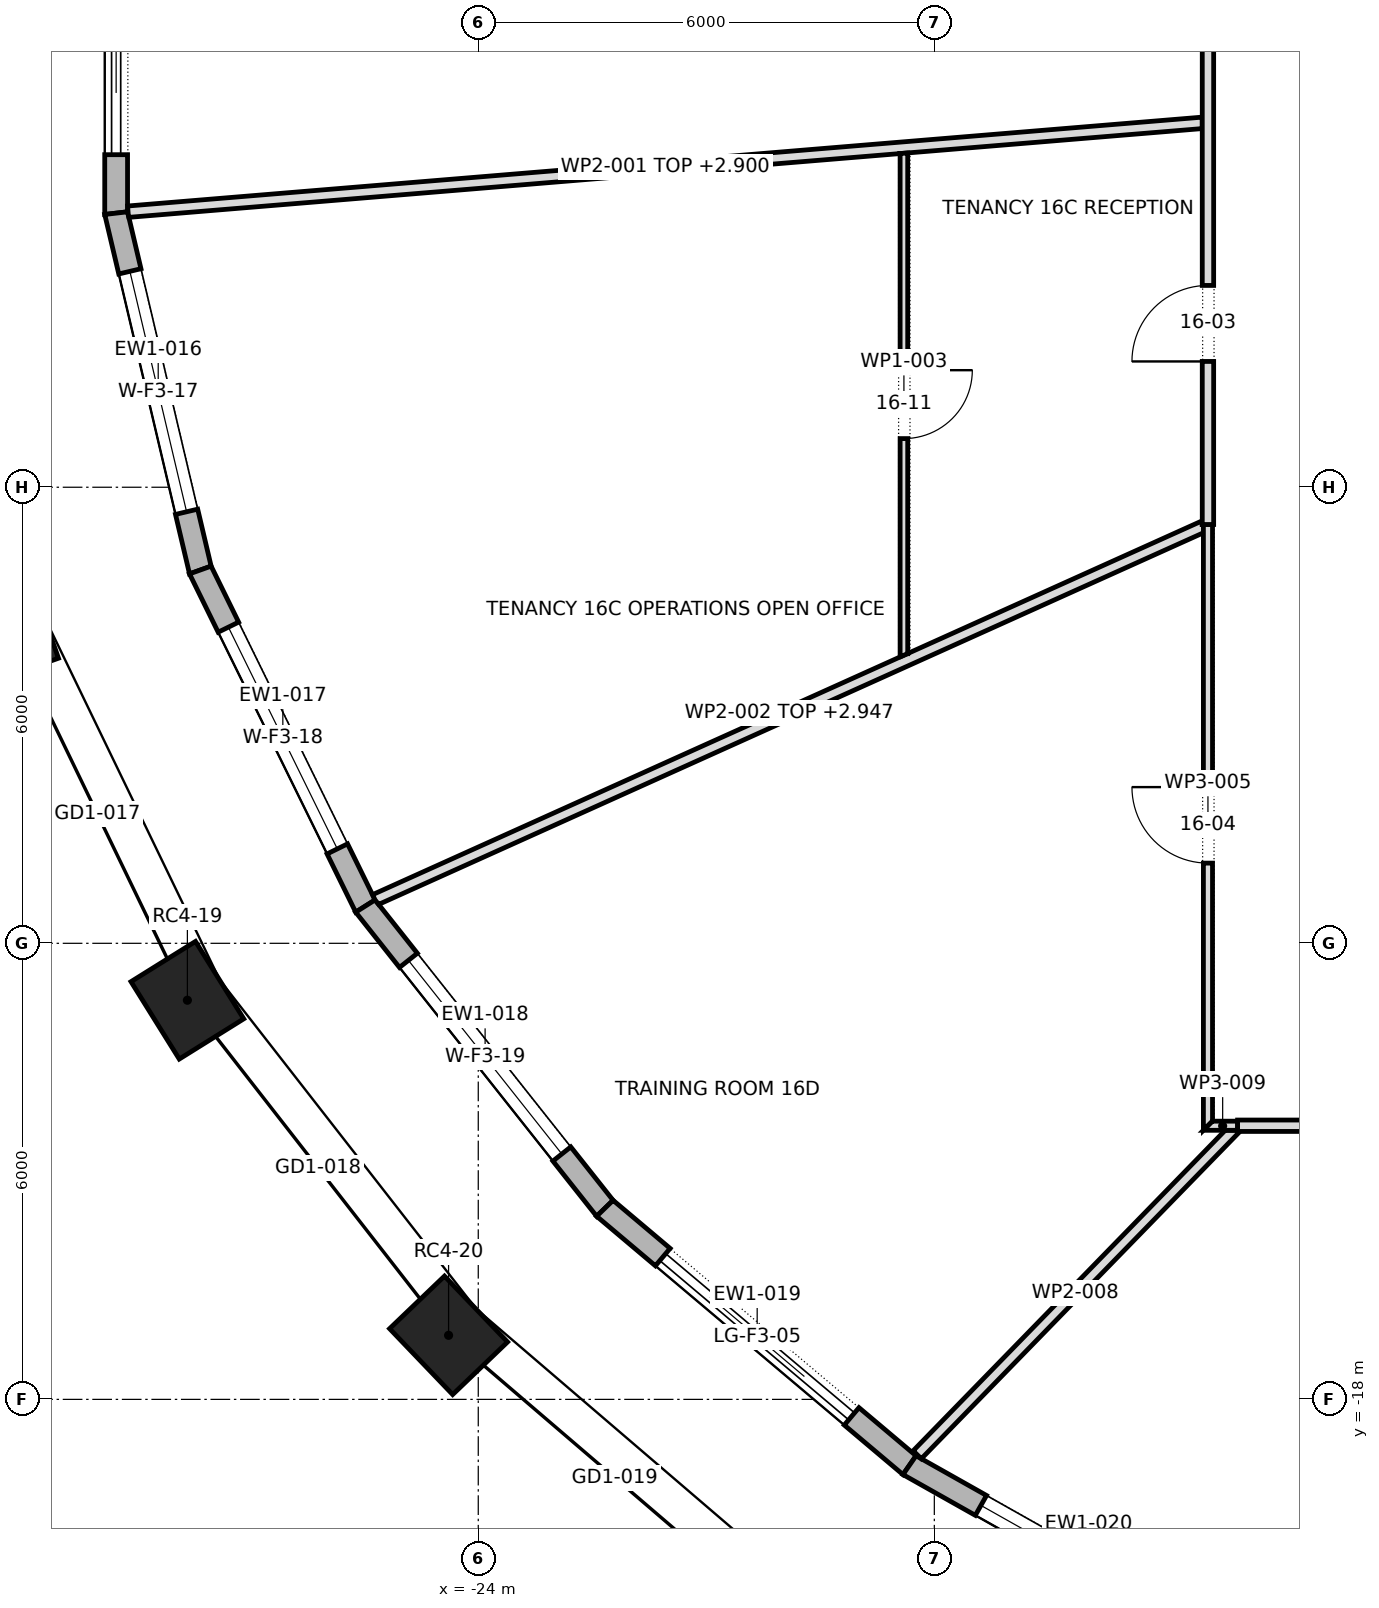
"""IFC4 building model, lengths in metres.
Left out: names, types, materials, properties, quantities, classifications, styles, units other than length and angle.
Written with IfcOpenShell. Run it as: python <this file> out.ifc"""

import sys

from ifc_helpers import new_model, si_unit, direction, frame, frame_2d, origin, origin_2d, place, context, subcontext, project, spatial, polyline, rectangle, outline, extrude, element, fill, save


model = new_model("IFC4")
c1 = context("Model", 3, precision=1e-05, world=origin(), true_north=direction((0.0, 1.0)))
c2 = subcontext(c1, "Body", "Model", "MODEL_VIEW")
j1 = project(units=[si_unit("LENGTHUNIT", "METRE"), si_unit("PLANEANGLEUNIT", "RADIAN")], contexts=[c1])
p1 = place(None, origin())
s1 = spatial("IfcSite", under=j1, at=p1, CompositionType="ELEMENT")
p2 = place(p1, origin())
s2 = spatial("IfcBuilding", under=s1, at=p2, CompositionType="ELEMENT")
p3 = place(p2, frame((0.0, 0.0, 226.9)))
s3 = spatial("IfcBuildingStorey", under=s2, at=p3, CompositionType="ELEMENT", Elevation=226.9)
for number, where, z_axis, x_axis in (
    (1, (-30.194, -7.851, 0.0), (0.0, 0.0, 1.0), (0.334, -0.943, 0.0)),
    (2, (-27.827, -12.749, 0.0), (0.0, 0.0, 1.0), (0.529, -0.849, 0.0)),
    (3, (-24.39, -17.157, 0.0), (0.0, 0.0, 1.0), (0.692, -0.722, 0.0)),
):
    element("IfcColumn", number, at=place(p3, frame(where, z_axis=z_axis, x_axis=x_axis)), inside=s3, PredefinedType="COLUMN", context=c2, shape_type="SweptSolid", body=[
        extrude(rectangle(XDim=1.2, YDim=1.0, at=origin_2d()), origin(), (0.0, 0.0, 1.0), 4.0),
    ])
p4 = place(p3, frame((-28.764, 2.394, 0.0), z_axis=(0.0, 0.0, 1.0), x_axis=(0.0, -1.0, 0.0)))
e4 = element("IfcWall", 4, at=p4, inside=s3, PredefinedType="STANDARD", context=c2, shape_type="SweptSolid", body=[
    extrude(outline(polyline([(-0.017, -0.15), (4.805, -0.15), (4.77, 0.15), (0.017, 0.15), (-0.017, -0.15)])), origin(), (0.0, 0.0, 1.0), 3.7),
])
p5 = place(p4, frame((0.769, 0.0, 0.0)))
e5 = element("IfcOpeningElement", 5, at=p5, cuts=e4, PredefinedType="OPENING", context=c2, shape_type="SweptSolid", body=[
    extrude(rectangle(XDim=3.25, YDim=3.25, at=frame_2d((1.625, 1.625))), frame((0.0, 0.162, 0.0), z_axis=(0.0, -1.0, 0.0), x_axis=(1.0, 0.0, 0.0)), (0.0, 0.0, 1.0), 0.324),
])
p6 = place(p3, frame((-28.764, -2.394, 0.0), z_axis=(0.0, 0.0, 1.0), x_axis=(0.229617574796, -0.97328093033, 0.0)))
e6 = element("IfcWall", 6, at=p6, inside=s3, PredefinedType="STANDARD", context=c2, shape_type="SweptSolid", body=[
    extrude(outline(polyline([(-0.017, -0.15), (4.841, -0.15), (4.807, 0.15), (0.017, 0.15), (-0.017, -0.15)])), origin(), (0.0, 0.0, 1.0), 3.7),
])
p7 = place(p6, frame((0.787, 0.0, 0.6)))
e7 = element("IfcOpeningElement", 7, at=p7, cuts=e6, PredefinedType="OPENING", context=c2, shape_type="SweptSolid", body=[
    extrude(rectangle(XDim=3.25, YDim=2.65, at=frame_2d((1.625, 1.325))), frame((0.0, 0.162, 0.0), z_axis=(0.0, -1.0, 0.0), x_axis=(1.0, 0.0, 0.0)), (0.0, 0.0, 1.0), 0.324),
])
p8 = place(p3, frame((-27.656, -7.089, 0.0), z_axis=(0.0, 0.0, 1.0), x_axis=(0.440857641837, -0.897577038272, 0.0)))
e8 = element("IfcWall", 8, at=p8, inside=s3, PredefinedType="STANDARD", context=c2, shape_type="SweptSolid", body=[
    extrude(outline(polyline([(-0.017, -0.15), (4.941, -0.15), (4.909, 0.15), (0.017, 0.15), (-0.017, -0.15)])), origin(), (0.0, 0.0, 1.0), 3.7),
])
p9 = place(p8, frame((0.838, 0.0, 0.6)))
e9 = element("IfcOpeningElement", 9, at=p9, cuts=e8, PredefinedType="OPENING", context=c2, shape_type="SweptSolid", body=[
    extrude(rectangle(XDim=3.25, YDim=2.65, at=frame_2d((1.625, 1.325))), frame((0.0, 0.162, 0.0), z_axis=(0.0, -1.0, 0.0), x_axis=(1.0, 0.0, 0.0)), (0.0, 0.0, 1.0), 0.324),
])
p10 = place(p3, frame((-25.485, -11.51, 0.0), z_axis=(0.0, 0.0, 1.0), x_axis=(0.621084984443, -0.783743224596, 0.0)))
e10 = element("IfcWall", 10, at=p10, inside=s3, PredefinedType="STANDARD", context=c2, shape_type="SweptSolid", body=[
    extrude(outline(polyline([(-0.016, -0.15), (5.088, -0.15), (5.058, 0.15), (0.016, 0.15), (-0.016, -0.15)])), origin(), (0.0, 0.0, 1.0), 3.7),
])
p11 = place(p10, frame((0.912, 0.0, 0.6)))
e11 = element("IfcOpeningElement", 11, at=p11, cuts=e10, PredefinedType="OPENING", context=c2, shape_type="SweptSolid", body=[
    extrude(rectangle(XDim=3.25, YDim=2.65, at=frame_2d((1.625, 1.325))), frame((0.0, 0.162, 0.0), z_axis=(0.0, -1.0, 0.0), x_axis=(1.0, 0.0, 0.0)), (0.0, 0.0, 1.0), 0.324),
])
p12 = place(p3, frame((-22.334, -15.486, 0.0), z_axis=(0.0, 0.0, 1.0), x_axis=(0.764475071601, -0.644653290459, 0.0)))
e12 = element("IfcWall", 12, at=p12, inside=s3, PredefinedType="STANDARD", context=c2, shape_type="SweptSolid", body=[
    extrude(outline(polyline([(-0.015, -0.15), (5.257, -0.15), (5.229, 0.15), (0.015, 0.15), (-0.015, -0.15)])), origin(), (0.0, 0.0, 1.0), 3.7),
])
p13 = place(p12, frame((0.996, 0.0, 0.0)))
e13 = element("IfcOpeningElement", 13, at=p13, cuts=e12, PredefinedType="OPENING", context=c2, shape_type="SweptSolid", body=[
    extrude(rectangle(XDim=3.25, YDim=3.25, at=frame_2d((1.625, 1.625))), frame((0.0, 0.162, 0.0), z_axis=(0.0, -1.0, 0.0), x_axis=(1.0, 0.0, 0.0)), (0.0, 0.0, 1.0), 0.324),
])
p14 = place(p3, frame((-18.326, -18.865, 0.0), z_axis=(0.0, 0.0, 1.0), x_axis=(0.871225596594, -0.490882837181, 0.0)))
e14 = element("IfcWall", 14, at=p14, inside=s3, PredefinedType="STANDARD", context=c2, shape_type="SweptSolid", body=[
    extrude(outline(polyline([(-0.014, -0.15), (5.42, -0.15), (5.393, 0.15), (0.014, 0.15), (-0.014, -0.15)])), origin(), (0.0, 0.0, 1.0), 3.7),
])
p15 = place(p14, frame((1.078, 0.0, 0.6)))
e15 = element("IfcOpeningElement", 15, at=p15, cuts=e14, PredefinedType="OPENING", context=c2, shape_type="SweptSolid", body=[
    extrude(rectangle(XDim=3.25, YDim=2.65, at=frame_2d((1.625, 1.325))), frame((0.0, 0.162, 0.0), z_axis=(0.0, -1.0, 0.0), x_axis=(1.0, 0.0, 0.0)), (0.0, 0.0, 1.0), 0.324),
])
p16 = place(p3, frame((-28.608, -2.375, 0.0), z_axis=(0.0, 0.0, 1.0), x_axis=(0.996598135394, 0.082414540768, 0.0)))
e16 = element("IfcWall", 16, at=p16, inside=s3, PredefinedType="PARTITIONING", context=c2, shape_type="SweptSolid", body=[
    extrude(outline(polyline([(0.005, -0.075), (1.701, -0.075), (3.398, -0.075), (5.095, -0.075), (6.792, -0.075), (8.489, -0.075), (10.186, -0.075), (10.186, -0.075), (10.189, -0.075), (12.182, -0.075), (14.175, -0.075), (14.187, 0.071), (14.187, 0.075), (12.413, 0.075), (10.64, 0.075), (8.867, 0.075), (7.093, 0.075), (5.32, 0.075), (3.547, 0.075), (1.773, 0.075), (0.0, 0.075), (0.0, -0.044), (0.005, -0.075)])), origin(), (0.0, 0.0, 1.0), 2.9),
])
p17 = place(p3, frame((-25.36, -11.428, 0.0), z_axis=(0.0, 0.0, 1.0), x_axis=(0.911719171836, 0.410814011089, 0.0)))
e17 = element("IfcWall", 17, at=p17, inside=s3, PredefinedType="PARTITIONING", context=c2, shape_type="SweptSolid", body=[
    extrude(outline(polyline([(0.021, -0.075), (2.004, -0.075), (3.988, -0.075), (5.971, -0.075), (7.955, -0.075), (9.938, -0.075), (11.922, -0.075), (11.967, 0.025), (11.953, 0.031), (11.972, 0.074), (11.972, 0.075), (10.556, 0.075), (9.139, 0.075), (7.723, 0.075), (7.722, 0.073), (7.717, 0.075), (5.788, 0.075), (3.858, 0.075), (1.929, 0.075), (0.0, 0.075), (0.0, 0.063), (0.002, -0.002), (0.021, -0.075)])), origin(), (0.0, 0.0, 1.0), 2.947),
])
p18 = place(p3, frame((-18.4, -8.232, 0.0), z_axis=(0.0, 0.0, 1.0), x_axis=(0.0, 1.0, 0.0)))
e18 = element("IfcWall", 18, at=p18, inside=s3, PredefinedType="PARTITIONING", context=c2, shape_type="SweptSolid", body=[
    extrude(outline(polyline([(6.63, -0.05), (6.63, -0.048), (6.622, 0.05), (4.967, 0.05), (3.311, 0.05), (1.656, 0.05), (0.0, 0.05), (0.0, 0.05), (0.045, -0.05), (1.691, -0.05), (3.338, -0.05), (4.984, -0.05), (6.63, -0.05)])), origin(), (0.0, 0.0, 1.0), 3.7),
])
p19 = place(p18, frame((2.873, 0.0, 0.0)))
e19 = element("IfcOpeningElement", 19, at=p19, cuts=e18, PredefinedType="OPENING", context=c2, shape_type="SweptSolid", body=[
    extrude(rectangle(XDim=0.9, YDim=2.1, at=frame_2d((0.45, 1.05))), frame((0.0, 0.062, 0.0), z_axis=(0.0, -1.0, 0.0), x_axis=(1.0, 0.0, 0.0)), (0.0, 0.0, 1.0), 0.124),
])
p20 = place(p3, frame((-14.4, -14.46, 0.0), z_axis=(0.0, 0.0, 1.0), x_axis=(0.0, 1.0, 0.0)))
e20 = element("IfcWall", 20, at=p20, inside=s3, PredefinedType="PARTITIONING", context=c2, shape_type="SweptSolid", body=[
    extrude(outline(polyline([(7.97, 0.06), (5.978, 0.06), (3.985, 0.06), (1.992, 0.06), (0.0, 0.06), (0.12, -0.06), (2.083, -0.06), (4.045, -0.06), (6.008, -0.06), (7.97, -0.06), (7.97, 0.06)])), origin(), (0.0, 0.0, 1.0), 3.7),
])
p21 = place(p20, frame((3.515, 0.0, 0.0)))
e21 = element("IfcOpeningElement", 21, at=p21, cuts=e20, PredefinedType="OPENING", context=c2, shape_type="SweptSolid", body=[
    extrude(rectangle(XDim=1.0, YDim=2.1, at=frame_2d((0.5, 1.05))), frame((0.0, 0.072, 0.0), z_axis=(0.0, -1.0, 0.0), x_axis=(1.0, 0.0, 0.0)), (0.0, 0.0, 1.0), 0.144),
])
p22 = place(p3, frame((-14.4, -6.49, 0.0), z_axis=(0.0, 0.0, 1.0), x_axis=(0.0, 1.0, 0.0)))
e22 = element("IfcWall", 22, at=p22, inside=s3, PredefinedType="PARTITIONING", context=c2, shape_type="SweptSolid", body=[
    extrude(outline(polyline([(16.499, -0.075), (16.499, -0.075), (16.421, 0.075), (14.596, 0.075), (12.772, 0.075), (10.947, 0.075), (9.123, 0.075), (7.298, 0.075), (5.474, 0.075), (3.649, 0.075), (1.824, 0.075), (0.0, 0.075), (0.0, -0.075), (1.833, -0.075), (3.667, -0.075), (5.5, -0.075), (7.333, -0.075), (9.166, -0.075), (11.0, -0.075), (12.833, -0.075), (14.666, -0.075), (16.499, -0.075)])), origin(), (0.0, 0.0, 1.0), 3.7),
])
p23 = place(p22, frame((9.975, 0.0, 0.0)))
e23 = element("IfcOpeningElement", 23, at=p23, cuts=e22, PredefinedType="OPENING", context=c2, shape_type="SweptSolid", body=[
    extrude(rectangle(XDim=1.8, YDim=2.1, at=frame_2d((0.9, 1.05))), frame((0.0, 0.087, 0.0), z_axis=(0.0, -1.0, 0.0), x_axis=(1.0, 0.0, 0.0)), (0.0, 0.0, 1.0), 0.174),
])
p24 = place(p22, frame((2.145, 0.0, 0.0)))
e24 = element("IfcOpeningElement", 24, at=p24, cuts=e22, PredefinedType="OPENING", context=c2, shape_type="SweptSolid", body=[
    extrude(rectangle(XDim=1.0, YDim=2.1, at=frame_2d((0.5, 1.05))), frame((0.0, 0.087, 0.0), z_axis=(0.0, -1.0, 0.0), x_axis=(1.0, 0.0, 0.0)), (0.0, 0.0, 1.0), 0.174),
])
p25 = place(p3, frame((-14.032, -14.423, 0.0), z_axis=(0.0, 0.0, 1.0), x_axis=(-0.697618878337, -0.716469050684, 0.0)))
e25 = element("IfcWall", 25, at=p25, inside=s3, PredefinedType="PARTITIONING", context=c2, shape_type="SweptSolid", body=[
    extrude(outline(polyline([(0.0, 0.075), (0.0, 0.075), (0.022, 0.052), (0.011, 0.042), (0.125, -0.075), (2.086, -0.075), (4.048, -0.075), (6.01, -0.075), (6.01, 0.075), (4.507, 0.075), (3.005, 0.075), (1.502, 0.075), (0.0, 0.075)])), origin(), (0.0, 0.0, 1.0), 3.7),
])
p26 = place(p3, frame((-14.01, -14.4, 0.0), z_axis=(0.0, 0.0, 1.0), x_axis=(-1.0, 0.0, 0.0)))
e26 = element("IfcWall", 26, at=p26, inside=s3, PredefinedType="PARTITIONING", context=c2, shape_type="SweptSolid", body=[
    extrude(outline(polyline([(0.0, -0.06), (0.33, -0.06), (0.45, 0.06), (0.0, 0.06), (0.0, -0.06)])), origin(), (0.0, 0.0, 1.0), 3.7),
])
p27 = place(p3, frame((-1.596, -14.4, 0.0), z_axis=(0.0, 0.0, 1.0), x_axis=(-1.0, 0.0, 0.0)))
e27 = element("IfcWall", 27, at=p27, inside=s3, PredefinedType="PARTITIONING", context=c2, shape_type="SweptSolid", body=[
    extrude(outline(polyline([(12.414, 0.075), (10.665, 0.075), (8.916, 0.075), (7.166, 0.075), (5.417, 0.075), (3.667, 0.075), (1.918, 0.075), (0.168, 0.075), (0.0, -0.075), (0.0, -0.075), (1.773, -0.075), (3.547, -0.075), (5.32, -0.075), (7.094, -0.075), (8.867, -0.075), (10.641, -0.075), (12.414, -0.075), (12.414, 0.075)])), origin(), (0.0, 0.0, 1.0), 3.7),
])
p28 = place(p27, frame((5.749, 0.0, 0.0)))
e28 = element("IfcOpeningElement", 28, at=p28, cuts=e27, PredefinedType="OPENING", context=c2, shape_type="SweptSolid", body=[
    extrude(rectangle(XDim=1.0, YDim=2.1, at=frame_2d((0.5, 1.05))), frame((0.0, 0.087, 0.0), z_axis=(0.0, -1.0, 0.0), x_axis=(1.0, 0.0, 0.0)), (0.0, 0.0, 1.0), 0.174),
])
p29 = place(p5, origin())
e29 = element("IfcDoor", 29, at=p29, inside=s3, OperationType="DOUBLE_DOOR_SLIDING", PredefinedType="DOOR", context=c2, shape_type="SweptSolid", body=[
    extrude(rectangle(XDim=3.25, YDim=3.25, at=frame_2d((1.625, 1.625))), frame((0.0, 0.025, 0.0), z_axis=(0.0, -1.0, 0.0), x_axis=(1.0, 0.0, 0.0)), (0.0, 0.0, 1.0), 0.05),
])
fill(e5, e29)
p30 = place(p7, origin())
e30 = element("IfcWindow", 30, at=p30, inside=s3, PartitioningType="TRIPLE_PANEL_VERTICAL", PredefinedType="WINDOW", context=c2, shape_type="SweptSolid", body=[
    extrude(rectangle(XDim=3.25, YDim=2.65, at=frame_2d((1.625, 1.325))), frame((0.0, 0.03, 0.0), z_axis=(0.0, -1.0, 0.0), x_axis=(1.0, 0.0, 0.0)), (0.0, 0.0, 1.0), 0.06),
])
fill(e7, e30)
p31 = place(p9, origin())
e31 = element("IfcWindow", 31, at=p31, inside=s3, PartitioningType="TRIPLE_PANEL_VERTICAL", PredefinedType="WINDOW", context=c2, shape_type="SweptSolid", body=[
    extrude(rectangle(XDim=3.25, YDim=2.65, at=frame_2d((1.625, 1.325))), frame((0.0, 0.03, 0.0), z_axis=(0.0, -1.0, 0.0), x_axis=(1.0, 0.0, 0.0)), (0.0, 0.0, 1.0), 0.06),
])
fill(e9, e31)
p32 = place(p11, origin())
e32 = element("IfcWindow", 32, at=p32, inside=s3, PartitioningType="TRIPLE_PANEL_VERTICAL", PredefinedType="WINDOW", context=c2, shape_type="SweptSolid", body=[
    extrude(rectangle(XDim=3.25, YDim=2.65, at=frame_2d((1.625, 1.325))), frame((0.0, 0.03, 0.0), z_axis=(0.0, -1.0, 0.0), x_axis=(1.0, 0.0, 0.0)), (0.0, 0.0, 1.0), 0.06),
])
fill(e11, e32)
p33 = place(p13, origin())
e33 = element("IfcDoor", 33, at=p33, inside=s3, OperationType="DOUBLE_DOOR_SLIDING", PredefinedType="DOOR", context=c2, shape_type="SweptSolid", body=[
    extrude(rectangle(XDim=3.25, YDim=3.25, at=frame_2d((1.625, 1.625))), frame((0.0, 0.025, 0.0), z_axis=(0.0, -1.0, 0.0), x_axis=(1.0, 0.0, 0.0)), (0.0, 0.0, 1.0), 0.05),
])
fill(e13, e33)
p34 = place(p15, origin())
e34 = element("IfcWindow", 34, at=p34, inside=s3, PartitioningType="TRIPLE_PANEL_VERTICAL", PredefinedType="WINDOW", context=c2, shape_type="SweptSolid", body=[
    extrude(rectangle(XDim=3.25, YDim=2.65, at=frame_2d((1.625, 1.325))), frame((0.0, 0.03, 0.0), z_axis=(0.0, -1.0, 0.0), x_axis=(1.0, 0.0, 0.0)), (0.0, 0.0, 1.0), 0.06),
])
fill(e15, e34)
p35 = place(p24, origin())
e35 = element("IfcDoor", 35, at=p35, inside=s3, OperationType="SINGLE_SWING_RIGHT", PredefinedType="DOOR", context=c2, shape_type="SweptSolid", body=[
    extrude(rectangle(XDim=1.0, YDim=2.1, at=frame_2d((0.5, 1.05))), frame((0.0, 0.025, 0.0), z_axis=(0.0, -1.0, 0.0), x_axis=(1.0, 0.0, 0.0)), (0.0, 0.0, 1.0), 0.05),
])
fill(e24, e35)
p36 = place(p21, origin())
e36 = element("IfcDoor", 36, at=p36, inside=s3, OperationType="SINGLE_SWING_LEFT", PredefinedType="DOOR", context=c2, shape_type="SweptSolid", body=[
    extrude(rectangle(XDim=1.0, YDim=2.1, at=frame_2d((0.5, 1.05))), frame((0.0, 0.025, 0.0), z_axis=(0.0, -1.0, 0.0), x_axis=(1.0, 0.0, 0.0)), (0.0, 0.0, 1.0), 0.05),
])
fill(e21, e36)
p37 = place(p19, frame((0.9, 0.0, 0.0), z_axis=(0.0, 0.0, 1.0), x_axis=(-1.0, 0.0, 0.0)))
e37 = element("IfcDoor", 37, at=p37, inside=s3, OperationType="SINGLE_SWING_RIGHT", PredefinedType="DOOR", context=c2, shape_type="SweptSolid", body=[
    extrude(rectangle(XDim=0.9, YDim=2.1, at=frame_2d((0.45, 1.05))), frame((0.0, 0.025, 0.0), z_axis=(0.0, -1.0, 0.0), x_axis=(1.0, 0.0, 0.0)), (0.0, 0.0, 1.0), 0.05),
])
fill(e19, e37)
save(model, sys.argv[1])
